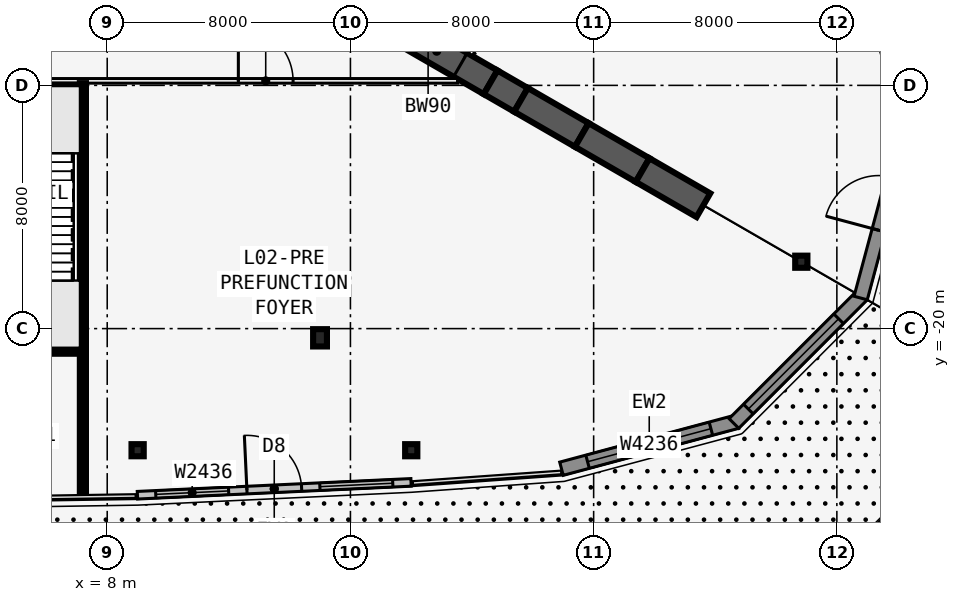
"""IFC4 building model, lengths in metres.
Left out: names, types, materials, properties, quantities, classifications, styles, units other than length and angle.
Written with IfcOpenShell. Run it as: python <this file> out.ifc"""

import sys

from ifc_helpers import new_model, si_unit, direction, frame, frame_2d, origin, origin_2d, place, context, subcontext, project, spatial, rectangle, i_section, extrude, element, fill, save


model = new_model("IFC4")
c1 = context("Model", 3, precision=1e-05, world=origin(), true_north=direction((0.0, 1.0)))
c2 = subcontext(c1, "Body", "Model", "MODEL_VIEW")
j1 = project(units=[si_unit("LENGTHUNIT", "METRE"), si_unit("PLANEANGLEUNIT", "RADIAN")], contexts=[c1])
p1 = place(None, origin())
s1 = spatial("IfcSite", under=j1, at=p1, CompositionType="ELEMENT")
p2 = place(p1, origin())
s2 = spatial("IfcBuilding", under=s1, at=p2, CompositionType="ELEMENT")
p3 = place(p2, frame((0.0, 0.0, 11.0)))
s3 = spatial("IfcBuildingStorey", under=s2, at=p3, CompositionType="ELEMENT", Elevation=11.0)
p4 = place(p3, frame((16.5, -9.526, 0.0), z_axis=(0.0, 0.0, 1.0), x_axis=(0.866031398331, -0.499989616998, 0.0)))
e1 = element("IfcWall", 1, at=p4, inside=s3, PredefinedType="SHEAR", context=c2, shape_type="SweptSolid", body=[
    extrude(rectangle(XDim=4.746, YDim=0.9, at=frame_2d((2.373, 0.0))), origin(), (0.0, 0.0, 1.0), 6.5),
])
p5 = place(p4, frame((1.8, 0.0, 0.0)))
e2 = element("IfcOpeningElement", 2, at=p5, cuts=e1, PredefinedType="OPENING", context=c2, shape_type="SweptSolid", body=[
    extrude(rectangle(XDim=1.8, YDim=2.13, at=frame_2d((0.9, 1.065))), frame((0.0, 0.46, 0.0), z_axis=(0.0, -1.0, 0.0), x_axis=(1.0, 0.0, 0.0)), (0.0, 0.0, 1.0), 0.92),
])
p6 = place(p3, frame((20.61, -11.899, 0.0), z_axis=(0.0, 0.0, 1.0), x_axis=(0.866009537788, -0.500027479704, 0.0)))
e3 = element("IfcWall", 3, at=p6, inside=s3, PredefinedType="SHEAR", context=c2, shape_type="SweptSolid", body=[
    extrude(rectangle(XDim=1.155, YDim=0.9, at=frame_2d((0.577, 0.0))), origin(), (0.0, 0.0, 1.0), 6.5),
])
for number, where, z_axis, x_axis in (
    (4, (21.61, -12.477, 0.0), (0.0, 0.0, 1.0), (0.866, -0.5, 0.0)),
    (5, (23.61, -13.631, 0.0), (0.0, 0.0, 1.0), (0.866, -0.5, 0.0)),
    (6, (25.61, -14.786, 0.0), (0.0, 0.0, 1.0), (0.866, -0.5, 0.0)),
):
    element("IfcWall", number, at=place(p3, frame(where, z_axis=z_axis, x_axis=x_axis)), inside=s3, PredefinedType="SHEAR", context=c2, shape_type="SweptSolid", body=[
        extrude(rectangle(XDim=2.309, YDim=0.9, at=frame_2d((1.155, 0.0))), origin(), (0.0, 0.0, 1.0), 6.5),
    ])
p7 = place(p3, frame((15.0, -20.303, 0.0), z_axis=(0.0, 0.0, 1.0), x_axis=(1.0, 0.0, 0.0)))
e7 = element("IfcColumn", 7, at=p7, inside=s3, PredefinedType="COLUMN", context=c2, shape_type="SweptSolid", body=[
    extrude(i_section(OverallWidth=0.455, OverallDepth=0.569, WebThickness=0.078, FlangeThickness=0.125, at=origin_2d()), origin(), (0.0, 0.0, 1.0), 6.5),
])
for number, where, z_axis, x_axis in (
    (8, (30.831, -17.8, 0.0), (0.0, 0.0, 1.0), (1.0, 0.0, 0.0)),
    (9, (18.0, -24.0, 0.0), (0.0, 0.0, 1.0), (1.0, 0.0, 0.0)),
    (10, (9.0, -24.0, 0.0), (0.0, 0.0, 1.0), (1.0, 0.0, 0.0)),
):
    element("IfcColumn", number, at=place(p3, frame(where, z_axis=z_axis, x_axis=x_axis)), inside=s3, PredefinedType="COLUMN", context=c2, shape_type="SweptSolid", body=[
        extrude(i_section(OverallWidth=0.401, OverallDepth=0.399, WebThickness=0.025, FlangeThickness=0.04, at=origin_2d()), origin(), (0.0, 0.0, 1.0), 6.5),
    ])
p8 = place(p3, frame((8.994, -25.48, 0.0), z_axis=(0.0, 0.0, 1.0), x_axis=(0.998899368932, 0.046904698557, 0.0)))
e11 = element("IfcWall", 11, at=p8, inside=s3, PredefinedType="STANDARD", context=c2, shape_type="SweptSolid", body=[
    extrude(rectangle(XDim=9.01, YDim=0.25, at=frame_2d((4.505, 0.0))), origin(), (0.0, 0.0, 1.0), 6.25),
])
p9 = place(p8, frame((3.605, 0.0, 0.0)))
e12 = element("IfcOpeningElement", 12, at=p9, cuts=e11, PredefinedType="OPENING", context=c2, shape_type="SweptSolid", body=[
    extrude(rectangle(XDim=1.8, YDim=2.4, at=frame_2d((0.9, 1.2))), frame((0.0, 0.135, 0.0), z_axis=(0.0, -1.0, 0.0), x_axis=(1.0, 0.0, 0.0)), (0.0, 0.0, 1.0), 0.27),
])
p10 = place(p8, frame((0.603, 0.0, 1.2)))
e13 = element("IfcOpeningElement", 13, at=p10, cuts=e11, PredefinedType="OPENING", context=c2, shape_type="SweptSolid", body=[
    extrude(rectangle(XDim=2.4, YDim=3.6, at=frame_2d((1.2, 1.8))), frame((0.0, 0.135, 0.0), z_axis=(0.0, -1.0, 0.0), x_axis=(1.0, 0.0, 0.0)), (0.0, 0.0, 1.0), 0.27),
])
p11 = place(p8, frame((6.007, 0.0, 1.2)))
e14 = element("IfcOpeningElement", 14, at=p11, cuts=e11, PredefinedType="OPENING", context=c2, shape_type="SweptSolid", body=[
    extrude(rectangle(XDim=2.4, YDim=3.6, at=frame_2d((1.2, 1.8))), frame((0.0, 0.135, 0.0), z_axis=(0.0, -1.0, 0.0), x_axis=(1.0, 0.0, 0.0)), (0.0, 0.0, 1.0), 0.27),
])
p12 = place(p3, frame((22.942, -24.609, 0.0), z_axis=(0.0, 0.0, 1.0), x_axis=(0.965920337451, 0.258839528858, 0.0)))
e15 = element("IfcWall", 15, at=p12, inside=s3, PredefinedType="SOLIDWALL", context=c2, shape_type="SweptSolid", body=[
    extrude(rectangle(XDim=5.977, YDim=0.45, at=frame_2d((2.989, 0.0))), origin(), (0.0, 0.0, 1.0), 6.25),
])
p13 = place(p12, frame((0.889, 0.0, 1.2)))
e16 = element("IfcOpeningElement", 16, at=p13, cuts=e15, PredefinedType="OPENING", context=c2, shape_type="SweptSolid", body=[
    extrude(rectangle(XDim=4.2, YDim=3.6, at=frame_2d((2.1, 1.8))), frame((0.0, 0.235, 0.0), z_axis=(0.0, -1.0, 0.0), x_axis=(1.0, 0.0, 0.0)), (0.0, 0.0, 1.0), 0.47),
])
p14 = place(p3, frame((28.615, -23.12, 0.0), z_axis=(0.0, 0.0, 1.0), x_axis=(0.707086357855, 0.707127203928, 0.0)))
e17 = element("IfcWall", 17, at=p14, inside=s3, PredefinedType="SOLIDWALL", context=c2, shape_type="SweptSolid", body=[
    extrude(rectangle(XDim=5.977, YDim=0.45, at=frame_2d((2.989, 0.0))), origin(), (0.0, 0.0, 1.0), 6.25),
])
p15 = place(p14, frame((0.67, 0.0, 1.2)))
e18 = element("IfcOpeningElement", 18, at=p15, cuts=e17, PredefinedType="OPENING", context=c2, shape_type="SweptSolid", body=[
    extrude(rectangle(XDim=4.2, YDim=3.6, at=frame_2d((2.1, 1.8))), frame((0.0, 0.235, 0.0), z_axis=(0.0, -1.0, 0.0), x_axis=(1.0, 0.0, 0.0)), (0.0, 0.0, 1.0), 0.47),
])
p16 = place(p3, frame((32.783, -18.994, 0.0), z_axis=(0.0, 0.0, 1.0), x_axis=(0.258801419081, 0.965930548995, 0.0)))
e19 = element("IfcWall", 19, at=p16, inside=s3, PredefinedType="SOLIDWALL", context=c2, shape_type="SweptSolid", body=[
    extrude(rectangle(XDim=5.977, YDim=0.45, at=frame_2d((2.989, 0.0))), origin(), (0.0, 0.0, 1.0), 6.25),
])
p17 = place(p16, frame((2.307, 0.0, 0.0)))
e20 = element("IfcOpeningElement", 20, at=p17, cuts=e19, PredefinedType="OPENING", context=c2, shape_type="SweptSolid", body=[
    extrude(rectangle(XDim=1.8, YDim=2.4, at=frame_2d((0.9, 1.2))), frame((0.0, 0.235, 0.0), z_axis=(0.0, -1.0, 0.0), x_axis=(1.0, 0.0, 0.0)), (0.0, 0.0, 1.0), 0.47),
])
p18 = place(p3, frame((34.33, -13.337, 0.0), z_axis=(0.0, 0.0, 1.0), x_axis=(-0.258791208569, 0.965933284636, 0.0)))
e21 = element("IfcWall", 21, at=p18, inside=s3, PredefinedType="SOLIDWALL", context=c2, shape_type="SweptSolid", body=[
    extrude(rectangle(XDim=5.977, YDim=0.45, at=frame_2d((2.989, 0.0))), origin(), (0.0, 0.0, 1.0), 6.25),
])
p19 = place(p18, frame((0.889, 0.0, 1.2)))
e22 = element("IfcOpeningElement", 22, at=p19, cuts=e21, PredefinedType="OPENING", context=c2, shape_type="SweptSolid", body=[
    extrude(rectangle(XDim=4.2, YDim=3.6, at=frame_2d((2.1, 1.8))), frame((0.0, 0.235, 0.0), z_axis=(0.0, -1.0, 0.0), x_axis=(1.0, 0.0, 0.0)), (0.0, 0.0, 1.0), 0.47),
])
p20 = place(p3, frame((-19.527, -11.851, 0.0), z_axis=(0.0, 0.0, 1.0), x_axis=(1.0, 0.0, 0.0)))
e23 = element("IfcWall", 23, at=p20, inside=s3, PredefinedType="PARTITIONING", context=c2, shape_type="SweptSolid", body=[
    extrude(rectangle(XDim=39.054, YDim=0.15, at=frame_2d((19.527, 0.0))), origin(), (0.0, 0.0, 1.0), 5.308),
])
p21 = place(p20, frame((10.013, 0.0, 0.0)))
e24 = element("IfcOpeningElement", 24, at=p21, cuts=e23, PredefinedType="OPENING", context=c2, shape_type="SweptSolid", body=[
    extrude(rectangle(XDim=1.8, YDim=2.13, at=frame_2d((0.9, 1.065))), frame((0.0, 0.085, 0.0), z_axis=(0.0, -1.0, 0.0), x_axis=(1.0, 0.0, 0.0)), (0.0, 0.0, 1.0), 0.17),
])
p22 = place(p20, frame((23.227, 0.0, 0.0)))
e25 = element("IfcOpeningElement", 25, at=p22, cuts=e23, PredefinedType="OPENING", context=c2, shape_type="SweptSolid", body=[
    extrude(rectangle(XDim=1.8, YDim=2.13, at=frame_2d((0.9, 1.065))), frame((0.0, 0.085, 0.0), z_axis=(0.0, -1.0, 0.0), x_axis=(1.0, 0.0, 0.0)), (0.0, 0.0, 1.0), 0.17),
])
p23 = place(p20, frame((31.841, 0.0, 0.0)))
e26 = element("IfcOpeningElement", 26, at=p23, cuts=e23, PredefinedType="OPENING", context=c2, shape_type="SweptSolid", body=[
    extrude(rectangle(XDim=1.8, YDim=2.13, at=frame_2d((0.9, 1.065))), frame((0.0, 0.085, 0.0), z_axis=(0.0, -1.0, 0.0), x_axis=(1.0, 0.0, 0.0)), (0.0, 0.0, 1.0), 0.17),
])
p24 = place(p3, frame((7.2, -11.926, 0.0), z_axis=(0.0, 0.0, 1.0), x_axis=(0.0, -1.0, 0.0)))
e27 = element("IfcWall", 27, at=p24, inside=s3, PredefinedType="SHEAR", context=c2, shape_type="SweptSolid", body=[
    extrude(rectangle(XDim=13.526, YDim=0.2, at=frame_2d((6.763, 0.0))), origin(), (0.0, 0.0, 1.0), 6.5),
])
p25 = place(p3, frame((20.027, -10.985, 0.0), z_axis=(0.0, 0.0, 1.0), x_axis=(-0.500001677587, 0.866024435227, 0.0)))
e28 = element("IfcWall", 28, at=p25, inside=s3, PredefinedType="PARTITIONING", context=c2, shape_type="SweptSolid", body=[
    extrude(rectangle(XDim=39.054, YDim=0.15, at=frame_2d((19.527, 0.0))), origin(), (0.0, 0.0, 1.0), 5.308),
])
p26 = place(p25, frame((10.013, 0.0, 0.0)))
e29 = element("IfcOpeningElement", 29, at=p26, cuts=e28, PredefinedType="OPENING", context=c2, shape_type="SweptSolid", body=[
    extrude(rectangle(XDim=1.8, YDim=2.13, at=frame_2d((0.9, 1.065))), frame((0.0, 0.085, 0.0), z_axis=(0.0, -1.0, 0.0), x_axis=(1.0, 0.0, 0.0)), (0.0, 0.0, 1.0), 0.17),
])
p27 = place(p25, frame((23.227, 0.0, 0.0)))
e30 = element("IfcOpeningElement", 30, at=p27, cuts=e28, PredefinedType="OPENING", context=c2, shape_type="SweptSolid", body=[
    extrude(rectangle(XDim=1.8, YDim=2.13, at=frame_2d((0.9, 1.065))), frame((0.0, 0.085, 0.0), z_axis=(0.0, -1.0, 0.0), x_axis=(1.0, 0.0, 0.0)), (0.0, 0.0, 1.0), 0.17),
])
p28 = place(p25, frame((27.627, 0.0, 0.0)))
e31 = element("IfcOpeningElement", 31, at=p28, cuts=e28, PredefinedType="OPENING", context=c2, shape_type="SweptSolid", body=[
    extrude(rectangle(XDim=1.0, YDim=2.13, at=frame_2d((0.5, 1.065))), frame((0.0, 0.085, 0.0), z_axis=(0.0, -1.0, 0.0), x_axis=(1.0, 0.0, 0.0)), (0.0, 0.0, 1.0), 0.17),
])
p29 = place(p25, frame((30.527, 0.0, 0.0)))
e32 = element("IfcOpeningElement", 32, at=p29, cuts=e28, PredefinedType="OPENING", context=c2, shape_type="SweptSolid", body=[
    extrude(rectangle(XDim=1.0, YDim=2.13, at=frame_2d((0.5, 1.065))), frame((0.0, 0.085, 0.0), z_axis=(0.0, -1.0, 0.0), x_axis=(1.0, 0.0, 0.0)), (0.0, 0.0, 1.0), 0.17),
])
p30 = place(p25, frame((33.277, 0.0, 0.0)))
e33 = element("IfcOpeningElement", 33, at=p30, cuts=e28, PredefinedType="OPENING", context=c2, shape_type="SweptSolid", body=[
    extrude(rectangle(XDim=1.0, YDim=2.13, at=frame_2d((0.5, 1.065))), frame((0.0, 0.085, 0.0), z_axis=(0.0, -1.0, 0.0), x_axis=(1.0, 0.0, 0.0)), (0.0, 0.0, 1.0), 0.17),
])
p31 = place(p25, frame((35.99, 0.0, 0.0)))
e34 = element("IfcOpeningElement", 34, at=p31, cuts=e28, PredefinedType="OPENING", context=c2, shape_type="SweptSolid", body=[
    extrude(rectangle(XDim=1.8, YDim=2.13, at=frame_2d((0.9, 1.065))), frame((0.0, 0.085, 0.0), z_axis=(0.0, -1.0, 0.0), x_axis=(1.0, 0.0, 0.0)), (0.0, 0.0, 1.0), 0.17),
])
p32 = place(p3, frame((2.0, -20.726, 0.0), z_axis=(0.0, 0.0, 1.0), x_axis=(1.0, 0.0, 0.0)))
e35 = element("IfcWall", 35, at=p32, inside=s3, PredefinedType="SHEAR", context=c2, shape_type="SweptSolid", body=[
    extrude(rectangle(XDim=5.2, YDim=0.2, at=frame_2d((2.6, 0.0))), origin(), (0.0, 0.0, 1.0), 6.5),
])
p33 = place(p3, frame((5.6, -11.976, 0.0), z_axis=(0.0, 0.0, 1.0), x_axis=(1.0, 0.0, 0.0)))
e36 = element("IfcWall", 36, at=p33, inside=s3, PredefinedType="SOLIDWALL", context=c2, shape_type="SweptSolid", body=[
    extrude(rectangle(XDim=1.5, YDim=0.1, at=frame_2d((0.75, 0.0))), origin(), (0.0, 0.0, 1.0), 6.5),
])
p34 = place(p9, origin())
e37 = element("IfcDoor", 37, at=p34, inside=s3, OperationType="DOUBLE_DOOR_SINGLE_SWING", PredefinedType="DOOR", context=c2, shape_type="SweptSolid", body=[
    extrude(rectangle(XDim=1.8, YDim=2.4, at=frame_2d((0.9, 1.2))), frame((0.0, 0.025, 0.0), z_axis=(0.0, -1.0, 0.0), x_axis=(1.0, 0.0, 0.0)), (0.0, 0.0, 1.0), 0.05),
])
fill(e12, e37)
p35 = place(p10, origin())
e38 = element("IfcWindow", 38, at=p35, inside=s3, PartitioningType="SINGLE_PANEL", PredefinedType="WINDOW", context=c2, shape_type="SweptSolid", body=[
    extrude(rectangle(XDim=2.4, YDim=3.6, at=frame_2d((1.2, 1.8))), frame((0.0, 0.03, 0.0), z_axis=(0.0, -1.0, 0.0), x_axis=(1.0, 0.0, 0.0)), (0.0, 0.0, 1.0), 0.06),
])
fill(e13, e38)
p36 = place(p11, origin())
e39 = element("IfcWindow", 39, at=p36, inside=s3, PartitioningType="SINGLE_PANEL", PredefinedType="WINDOW", context=c2, shape_type="SweptSolid", body=[
    extrude(rectangle(XDim=2.4, YDim=3.6, at=frame_2d((1.2, 1.8))), frame((0.0, 0.03, 0.0), z_axis=(0.0, -1.0, 0.0), x_axis=(1.0, 0.0, 0.0)), (0.0, 0.0, 1.0), 0.06),
])
fill(e14, e39)
p37 = place(p13, origin())
e40 = element("IfcWindow", 40, at=p37, inside=s3, PartitioningType="SINGLE_PANEL", PredefinedType="WINDOW", context=c2, shape_type="SweptSolid", body=[
    extrude(rectangle(XDim=4.2, YDim=3.6, at=frame_2d((2.1, 1.8))), frame((0.0, 0.03, 0.0), z_axis=(0.0, -1.0, 0.0), x_axis=(1.0, 0.0, 0.0)), (0.0, 0.0, 1.0), 0.06),
])
fill(e16, e40)
p38 = place(p15, origin())
e41 = element("IfcWindow", 41, at=p38, inside=s3, PartitioningType="SINGLE_PANEL", PredefinedType="WINDOW", context=c2, shape_type="SweptSolid", body=[
    extrude(rectangle(XDim=4.2, YDim=3.6, at=frame_2d((2.1, 1.8))), frame((0.0, 0.03, 0.0), z_axis=(0.0, -1.0, 0.0), x_axis=(1.0, 0.0, 0.0)), (0.0, 0.0, 1.0), 0.06),
])
fill(e18, e41)
p39 = place(p17, origin())
e42 = element("IfcDoor", 42, at=p39, inside=s3, OperationType="DOUBLE_DOOR_SINGLE_SWING", PredefinedType="DOOR", context=c2, shape_type="SweptSolid", body=[
    extrude(rectangle(XDim=1.8, YDim=2.4, at=frame_2d((0.9, 1.2))), frame((0.0, 0.025, 0.0), z_axis=(0.0, -1.0, 0.0), x_axis=(1.0, 0.0, 0.0)), (0.0, 0.0, 1.0), 0.05),
])
fill(e20, e42)
p40 = place(p19, origin())
e43 = element("IfcWindow", 43, at=p40, inside=s3, PartitioningType="SINGLE_PANEL", PredefinedType="WINDOW", context=c2, shape_type="SweptSolid", body=[
    extrude(rectangle(XDim=4.2, YDim=3.6, at=frame_2d((2.1, 1.8))), frame((0.0, 0.03, 0.0), z_axis=(0.0, -1.0, 0.0), x_axis=(1.0, 0.0, 0.0)), (0.0, 0.0, 1.0), 0.06),
])
fill(e22, e43)
p41 = place(p23, origin())
e44 = element("IfcDoor", 44, at=p41, inside=s3, OperationType="DOUBLE_DOOR_SINGLE_SWING", PredefinedType="DOOR", context=c2, shape_type="SweptSolid", body=[
    extrude(rectangle(XDim=1.8, YDim=2.13, at=frame_2d((0.9, 1.065))), frame((0.0, 0.025, 0.0), z_axis=(0.0, -1.0, 0.0), x_axis=(1.0, 0.0, 0.0)), (0.0, 0.0, 1.0), 0.05),
])
fill(e26, e44)
p42 = place(p5, origin())
e45 = element("IfcDoor", 45, at=p42, inside=s3, OperationType="DOUBLE_DOOR_DOUBLE_SWING", PredefinedType="DOOR", context=c2, shape_type="SweptSolid", body=[
    extrude(rectangle(XDim=1.8, YDim=2.13, at=frame_2d((0.9, 1.065))), frame((0.0, 0.025, 0.0), z_axis=(0.0, -1.0, 0.0), x_axis=(1.0, 0.0, 0.0)), (0.0, 0.0, 1.0), 0.05),
])
fill(e2, e45)
save(model, sys.argv[1])
